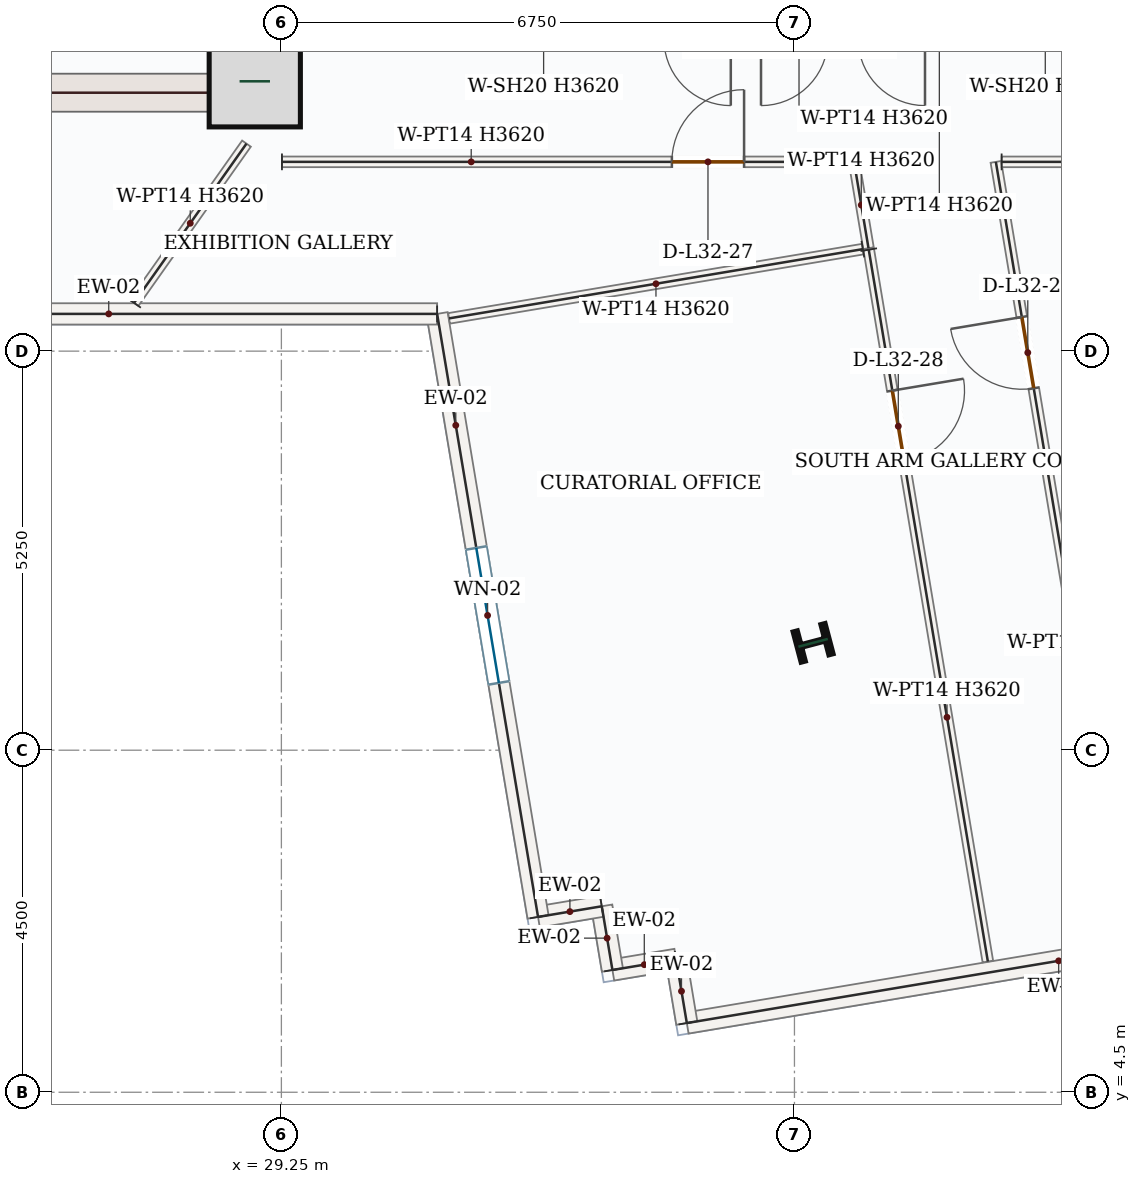
"""IFC4 building model, lengths in metres.
Left out: names, types, materials, properties, quantities, classifications, styles, units other than length and angle.
Written with IfcOpenShell. Run it as: python <this file> out.ifc"""

import sys

from ifc_helpers import new_model, si_unit, direction, frame, frame_2d, origin, origin_2d, place, context, subcontext, project, spatial, rectangle, i_section, extrude, source, transform, mapped, element, fill, save


model = new_model("IFC4")
c1 = context("Model", 3, precision=1e-05, world=origin(), true_north=direction((0.0, 1.0)))
c2 = subcontext(c1, "Body", "Model", "MODEL_VIEW")
j1 = project(units=[si_unit("LENGTHUNIT", "METRE"), si_unit("PLANEANGLEUNIT", "RADIAN")], contexts=[c1])
p1 = place(None, origin())
s1 = spatial("IfcSite", under=j1, at=p1, CompositionType="ELEMENT")
p2 = place(p1, origin())
s2 = spatial("IfcBuilding", under=s1, at=p2, CompositionType="ELEMENT")
p3 = place(p2, frame((0.0, 0.0, 143.4)))
s3 = spatial("IfcBuildingStorey", under=s2, at=p3, CompositionType="ELEMENT", Elevation=143.4)
p4 = place(p3, frame((29.0, 17.4, 0.0), z_axis=(0.0, 0.0, 1.0), x_axis=(0.0, 1.0, 0.0)))
e1 = element("IfcWall", 1, at=p4, inside=s3, PredefinedType="SHEAR", context=c2, shape_type="SweptSolid", body=[
    extrude(rectangle(XDim=8.55, YDim=0.5, at=frame_2d((4.275, 0.0))), origin(), (0.0, 0.0, 1.0), 3.62),
])
p5 = place(p4, frame((6.65, 0.0, 0.0)))
e2 = element("IfcOpeningElement", 2, at=p5, cuts=e1, PredefinedType="OPENING", context=c2, shape_type="SweptSolid", body=[
    extrude(rectangle(XDim=1.1, YDim=2.2, at=frame_2d((0.55, 1.1))), frame((0.0, 0.26, 0.0), z_axis=(0.0, -1.0, 0.0), x_axis=(1.0, 0.0, 0.0)), (0.0, 0.0, 1.0), 0.52),
])
p6 = place(p4, frame((2.7, 0.0, 0.0)))
e3 = element("IfcOpeningElement", 3, at=p6, cuts=e1, PredefinedType="OPENING", context=c2, shape_type="SweptSolid", body=[
    extrude(rectangle(XDim=0.88, YDim=2.1, at=frame_2d((0.44, 1.05))), frame((0.0, 0.26, 0.0), z_axis=(0.0, -1.0, 0.0), x_axis=(1.0, 0.0, 0.0)), (0.0, 0.0, 1.0), 0.52),
])
p7 = place(p4, frame((4.6, 0.0, 0.0)))
e4 = element("IfcOpeningElement", 4, at=p7, cuts=e1, PredefinedType="OPENING", context=c2, shape_type="SweptSolid", body=[
    extrude(rectangle(XDim=0.88, YDim=2.1, at=frame_2d((0.44, 1.05))), frame((0.0, 0.26, 0.0), z_axis=(0.0, -1.0, 0.0), x_axis=(1.0, 0.0, 0.0)), (0.0, 0.0, 1.0), 0.52),
])
m1 = source(origin(), c2, "Body", "SweptSolid", [
    extrude(rectangle(XDim=7.0, YDim=0.5, at=frame_2d((3.5, 0.0))), origin(), (0.0, 0.0, 1.0), 3.62),
])
p8 = place(p3, frame((21.75, 17.65, 0.0), z_axis=(0.0, 0.0, 1.0), x_axis=(1.0, 0.0, 0.0)))
e5 = element("IfcWall", 5, at=p8, inside=s3, PredefinedType="SHEAR", context=c2, shape_type="MappedRepresentation", body=[
    mapped(m1, transform((0.0, 0.0, 0.0), x_axis=(1.0, 0.0, 0.0), y_axis=(0.0, 1.0, 0.0), z_axis=(0.0, 0.0, 1.0), scale=1.0)),
])
m2 = source(origin(), c2, "Body", "SweptSolid", [
    extrude(rectangle(XDim=1.2, YDim=1.2, at=origin_2d()), origin(), (0.0, 0.0, 1.0), 3.9),
])
p9 = place(p3, frame((28.9, 17.8, 0.0), z_axis=(0.0, 0.0, 1.0), x_axis=(1.0, 0.0, 0.0)))
e6 = element("IfcColumn", 6, at=p9, inside=s3, PredefinedType="COLUMN", context=c2, shape_type="MappedRepresentation", body=[
    mapped(m2, transform((0.0, 0.0, 0.0), x_axis=(1.0, 0.0, 0.0), y_axis=(0.0, 1.0, 0.0), z_axis=(0.0, 0.0, 1.0), scale=1.0)),
])
m3 = source(origin(), c2, "Body", "SweptSolid", [
    extrude(i_section(OverallWidth=0.412, OverallDepth=0.435, WebThickness=0.036, FlangeThickness=0.057, FilletRadius=0.018, at=origin_2d()), origin(), (0.0, 0.0, 1.0), 3.9),
])
p10 = place(p3, frame((36.245, 10.412, 0.0), z_axis=(0.0, 0.0, 1.0), x_axis=(-0.255445757936, 0.966823388604, 0.0)))
e7 = element("IfcColumn", 7, at=p10, inside=s3, PredefinedType="COLUMN", context=c2, shape_type="MappedRepresentation", body=[
    mapped(m3, transform((0.0, 0.0, 0.0), x_axis=(1.0, 0.0, 0.0), y_axis=(0.0, 1.0, 0.0), z_axis=(0.0, 0.0, 1.0), scale=1.0)),
])
m4 = source(origin(), c2, "Body", "SweptSolid", [
    extrude(rectangle(XDim=9.92, YDim=0.28, at=frame_2d((4.96, 0.0))), origin(), (0.0, 0.0, 1.0), 3.62),
])
p11 = place(p3, frame((44.368, 7.048, 0.0), z_axis=(0.0, 0.0, 1.0), x_axis=(-0.986282616944, -0.165065440096, 0.0)))
e8 = element("IfcWall", 8, at=p11, inside=s3, PredefinedType="SOLIDWALL", context=c2, shape_type="MappedRepresentation", body=[
    mapped(m4, transform((0.0, 0.0, 0.0), x_axis=(1.0, 0.0, 0.0), y_axis=(0.0, 1.0, 0.0), z_axis=(0.0, 0.0, 1.0), scale=1.0)),
])
m5 = source(origin(), c2, "Body", "SweptSolid", [
    extrude(rectangle(XDim=0.85, YDim=0.28, at=frame_2d((0.425, 0.0))), origin(), (0.0, 0.0, 1.0), 3.62),
])
for number, where, z_axis, x_axis in (
    (9, (34.584, 5.41, 0.0), (0.0, 0.0, 1.0), (-0.165, 0.986, 0.0)),
    (10, (34.444, 6.249, 0.0), (0.0, 0.0, 1.0), (-0.986, -0.165, 0.0)),
):
    element("IfcWall", number, at=place(p3, frame(where, z_axis=z_axis, x_axis=x_axis)), inside=s3, PredefinedType="SOLIDWALL", context=c2, shape_type="MappedRepresentation", body=[
        mapped(m5, transform((0.0, 0.0, 0.0), x_axis=(1.0, 0.0, 0.0), y_axis=(0.0, 1.0, 0.0), z_axis=(0.0, 0.0, 1.0), scale=1.0)),
    ])
m6 = source(origin(), c2, "Body", "SweptSolid", [
    extrude(rectangle(XDim=0.85, YDim=0.28, at=frame_2d((0.425, 0.0))), origin(), (0.0, 0.0, 1.0), 3.62),
])
p12 = place(p3, frame((33.605, 6.108, 0.0), z_axis=(0.0, 0.0, 1.0), x_axis=(-0.164911450083, 0.986308376539, 0.0)))
e11 = element("IfcWall", 11, at=p12, inside=s3, PredefinedType="SOLIDWALL", context=c2, shape_type="MappedRepresentation", body=[
    mapped(m6, transform((0.0, 0.0, 0.0), x_axis=(1.0, 0.0, 0.0), y_axis=(0.0, 1.0, 0.0), z_axis=(0.0, 0.0, 1.0), scale=1.0)),
])
p13 = place(p3, frame((33.465, 6.947, 0.0), z_axis=(0.0, 0.0, 1.0), x_axis=(-0.986316186628, -0.164864732418, 0.0)))
e12 = element("IfcWall", 12, at=p13, inside=s3, PredefinedType="SOLIDWALL", context=c2, shape_type="MappedRepresentation", body=[
    mapped(m5, transform((0.0, 0.0, 0.0), x_axis=(1.0, 0.0, 0.0), y_axis=(0.0, 1.0, 0.0), z_axis=(0.0, 0.0, 1.0), scale=1.0)),
])
p14 = place(p3, frame((32.627, 6.806, 0.0), z_axis=(0.0, 0.0, 1.0), x_axis=(-0.165048626668, 0.986285430712, 0.0)))
e13 = element("IfcWall", 13, at=p14, inside=s3, PredefinedType="SOLIDWALL", context=c2, shape_type="SweptSolid", body=[
    extrude(rectangle(XDim=8.044, YDim=0.28, at=frame_2d((4.022, 0.0))), origin(), (0.0, 0.0, 1.0), 3.62),
])
p15 = place(p14, frame((3.122, 0.0, 0.85)))
e14 = element("IfcOpeningElement", 14, at=p15, cuts=e13, PredefinedType="OPENING", context=c2, shape_type="SweptSolid", body=[
    extrude(rectangle(XDim=1.8, YDim=1.75, at=frame_2d((0.9, 0.875))), frame((0.0, 0.15, 0.0), z_axis=(0.0, -1.0, 0.0), x_axis=(1.0, 0.0, 0.0)), (0.0, 0.0, 1.0), 0.3),
])
m7 = source(origin(), c2, "Body", "SweptSolid", [
    extrude(rectangle(XDim=8.641, YDim=0.28, at=frame_2d((4.321, 0.0))), origin(), (0.0, 0.0, 1.0), 3.62),
])
p16 = place(p3, frame((31.299, 14.74, 0.0), z_axis=(0.0, 0.0, 1.0), x_axis=(-1.0, 0.0, 0.0)))
e15 = element("IfcWall", 15, at=p16, inside=s3, PredefinedType="SOLIDWALL", context=c2, shape_type="MappedRepresentation", body=[
    mapped(m7, transform((0.0, 0.0, 0.0), x_axis=(1.0, 0.0, 0.0), y_axis=(0.0, 1.0, 0.0), z_axis=(0.0, 0.0, 1.0), scale=1.0)),
])
p17 = place(p3, frame((29.258, 16.74, 0.0), z_axis=(0.0, 0.0, 1.0), x_axis=(0.999999999474, -3.2436991e-05, 0.0)))
e16 = element("IfcWall", 16, at=p17, inside=s3, PredefinedType="PARTITIONING", context=c2, shape_type="SweptSolid", body=[
    extrude(rectangle(XDim=7.527, YDim=0.14, at=frame_2d((3.763, 0.0))), origin(), (0.0, 0.0, 1.0), 3.62),
])
p18 = place(p17, frame((5.13, 0.0, 0.0)))
e17 = element("IfcOpeningElement", 17, at=p18, cuts=e16, PredefinedType="OPENING", context=c2, shape_type="SweptSolid", body=[
    extrude(rectangle(XDim=0.95, YDim=2.15, at=frame_2d((0.475, 1.075))), frame((0.0, 0.08, 0.0), z_axis=(0.0, -1.0, 0.0), x_axis=(1.0, 0.0, 0.0)), (0.0, 0.0, 1.0), 0.16),
])
m8 = source(origin(), c2, "Body", "SweptSolid", [
    extrude(rectangle(XDim=1.151, YDim=0.14, at=frame_2d((0.576, 0.0))), origin(), (0.0, 0.0, 1.0), 3.62),
])
p19 = place(p3, frame((36.784, 16.74, 0.0), z_axis=(0.0, 0.0, 1.0), x_axis=(0.164983559387, -0.986296317104, 0.0)))
e18 = element("IfcWall", 18, at=p19, inside=s3, PredefinedType="PARTITIONING", context=c2, shape_type="MappedRepresentation", body=[
    mapped(m8, transform((0.0, 0.0, 0.0), x_axis=(1.0, 0.0, 0.0), y_axis=(0.0, 1.0, 0.0), z_axis=(0.0, 0.0, 1.0), scale=1.0)),
])
m9 = source(origin(), c2, "Body", "SweptSolid", [
    extrude(rectangle(XDim=5.52, YDim=0.14, at=frame_2d((2.76, 0.0))), origin(), (0.0, 0.0, 1.0), 3.62),
])
p20 = place(p3, frame((36.9, 15.592, 0.0), z_axis=(0.0, 0.0, 1.0), x_axis=(-0.986290930087, -0.165015760545, 0.0)))
e19 = element("IfcWall", 19, at=p20, inside=s3, PredefinedType="PARTITIONING", context=c2, shape_type="MappedRepresentation", body=[
    mapped(m9, transform((0.0, 0.0, 0.0), x_axis=(1.0, 0.0, 0.0), y_axis=(0.0, 1.0, 0.0), z_axis=(0.0, 0.0, 1.0), scale=1.0)),
])
m10 = source(origin(), c2, "Body", "SweptSolid", [
    extrude(rectangle(XDim=2.565, YDim=0.14, at=frame_2d((1.282, 0.0))), origin(), (0.0, 0.0, 1.0), 3.62),
])
p21 = place(p3, frame((27.311, 14.885, 0.0), z_axis=(0.0, 0.0, 1.0), x_axis=(0.576926084836, 0.816796359343, 0.0)))
e20 = element("IfcWall", 20, at=p21, inside=s3, PredefinedType="PARTITIONING", context=c2, shape_type="MappedRepresentation", body=[
    mapped(m10, transform((0.0, 0.0, 0.0), x_axis=(1.0, 0.0, 0.0), y_axis=(0.0, 1.0, 0.0), z_axis=(0.0, 0.0, 1.0), scale=1.0)),
])
p22 = place(p3, frame((36.978, 15.585, 0.0), z_axis=(0.0, 0.0, 1.0), x_axis=(0.165024399413, -0.986289484684, 0.0)))
e21 = element("IfcWall", 21, at=p22, inside=s3, PredefinedType="PARTITIONING", context=c2, shape_type="SweptSolid", body=[
    extrude(rectangle(XDim=9.495, YDim=0.14, at=frame_2d((4.748, 0.0))), origin(), (0.0, 0.0, 1.0), 3.62),
])
p23 = place(p22, frame((1.88, 0.0, 0.0)))
e22 = element("IfcOpeningElement", 22, at=p23, cuts=e21, PredefinedType="OPENING", context=c2, shape_type="SweptSolid", body=[
    extrude(rectangle(XDim=0.95, YDim=2.15, at=frame_2d((0.475, 1.075))), frame((0.0, 0.08, 0.0), z_axis=(0.0, -1.0, 0.0), x_axis=(1.0, 0.0, 0.0)), (0.0, 0.0, 1.0), 0.16),
])
p24 = place(p3, frame((40.359, 6.524, 0.0), z_axis=(0.0, 0.0, 1.0), x_axis=(-0.165056345303, 0.986284139016, 0.0)))
e23 = element("IfcWall", 23, at=p24, inside=s3, PredefinedType="PARTITIONING", context=c2, shape_type="SweptSolid", body=[
    extrude(rectangle(XDim=10.358, YDim=0.14, at=frame_2d((5.179, 0.0))), origin(), (0.0, 0.0, 1.0), 3.62),
])
p25 = place(p24, frame((7.338, 0.0, 0.0)))
e24 = element("IfcOpeningElement", 24, at=p25, cuts=e23, PredefinedType="OPENING", context=c2, shape_type="SweptSolid", body=[
    extrude(rectangle(XDim=0.95, YDim=2.15, at=frame_2d((0.475, 1.075))), frame((0.0, 0.08, 0.0), z_axis=(0.0, -1.0, 0.0), x_axis=(1.0, 0.0, 0.0)), (0.0, 0.0, 1.0), 0.16),
])
m11 = source(origin(), c2, "Body", "SweptSolid", [
    extrude(rectangle(XDim=4.017, YDim=0.14, at=frame_2d((2.008, 0.0))), origin(), (0.0, 0.0, 1.0), 3.149),
])
p26 = place(p3, frame((38.726, 16.74, 0.0), z_axis=(0.0, 0.0, 1.0), x_axis=(0.999999998153, 6.0779189e-05, 0.0)))
e25 = element("IfcWall", 25, at=p26, inside=s3, PredefinedType="PARTITIONING", context=c2, shape_type="MappedRepresentation", body=[
    mapped(m11, transform((0.0, 0.0, 0.0), x_axis=(1.0, 0.0, 0.0), y_axis=(0.0, 1.0, 0.0), z_axis=(0.0, 0.0, 1.0), scale=1.0)),
])
m12 = source(origin(), c2, "Body", "SweptSolid", [
    extrude(rectangle(XDim=1.8, YDim=1.75, at=frame_2d((0.9, 0.875))), frame((0.0, 0.03, 0.0), z_axis=(0.0, -1.0, 0.0), x_axis=(1.0, 0.0, 0.0)), (0.0, 0.0, 1.0), 0.06),
])
p27 = place(p15, origin())
e26 = element("IfcWindow", 26, at=p27, inside=s3, PartitioningType="DOUBLE_PANEL_VERTICAL", PredefinedType="WINDOW", context=c2, shape_type="MappedRepresentation", body=[
    mapped(m12, transform((0.0, 0.0, 0.0), x_axis=(1.0, 0.0, 0.0), y_axis=(0.0, 1.0, 0.0), z_axis=(0.0, 0.0, 1.0), scale=1.0)),
])
fill(e14, e26)
m13 = source(origin(), c2, "Body", "SweptSolid", [
    extrude(rectangle(XDim=0.95, YDim=2.15, at=frame_2d((0.475, 1.075))), frame((0.0, 0.025, 0.0), z_axis=(0.0, -1.0, 0.0), x_axis=(1.0, 0.0, 0.0)), (0.0, 0.0, 1.0), 0.05),
])
p28 = place(p18, origin())
e27 = element("IfcDoor", 27, at=p28, inside=s3, OperationType="SINGLE_SWING_RIGHT", PredefinedType="DOOR", context=c2, shape_type="MappedRepresentation", body=[
    mapped(m13, transform((0.0, 0.0, 0.0), x_axis=(1.0, 0.0, 0.0), y_axis=(0.0, 1.0, 0.0), z_axis=(0.0, 0.0, 1.0), scale=1.0)),
])
fill(e17, e27)
p29 = place(p23, origin())
e28 = element("IfcDoor", 28, at=p29, inside=s3, OperationType="SINGLE_SWING_LEFT", PredefinedType="DOOR", context=c2, shape_type="MappedRepresentation", body=[
    mapped(m13, transform((0.0, 0.0, 0.0), x_axis=(1.0, 0.0, 0.0), y_axis=(0.0, 1.0, 0.0), z_axis=(0.0, 0.0, 1.0), scale=1.0)),
])
fill(e22, e28)
p30 = place(p25, origin())
e29 = element("IfcDoor", 29, at=p30, inside=s3, OperationType="SINGLE_SWING_RIGHT", PredefinedType="DOOR", context=c2, shape_type="MappedRepresentation", body=[
    mapped(m13, transform((0.0, 0.0, 0.0), x_axis=(1.0, 0.0, 0.0), y_axis=(0.0, 1.0, 0.0), z_axis=(0.0, 0.0, 1.0), scale=1.0)),
])
fill(e24, e29)
save(model, sys.argv[1])
